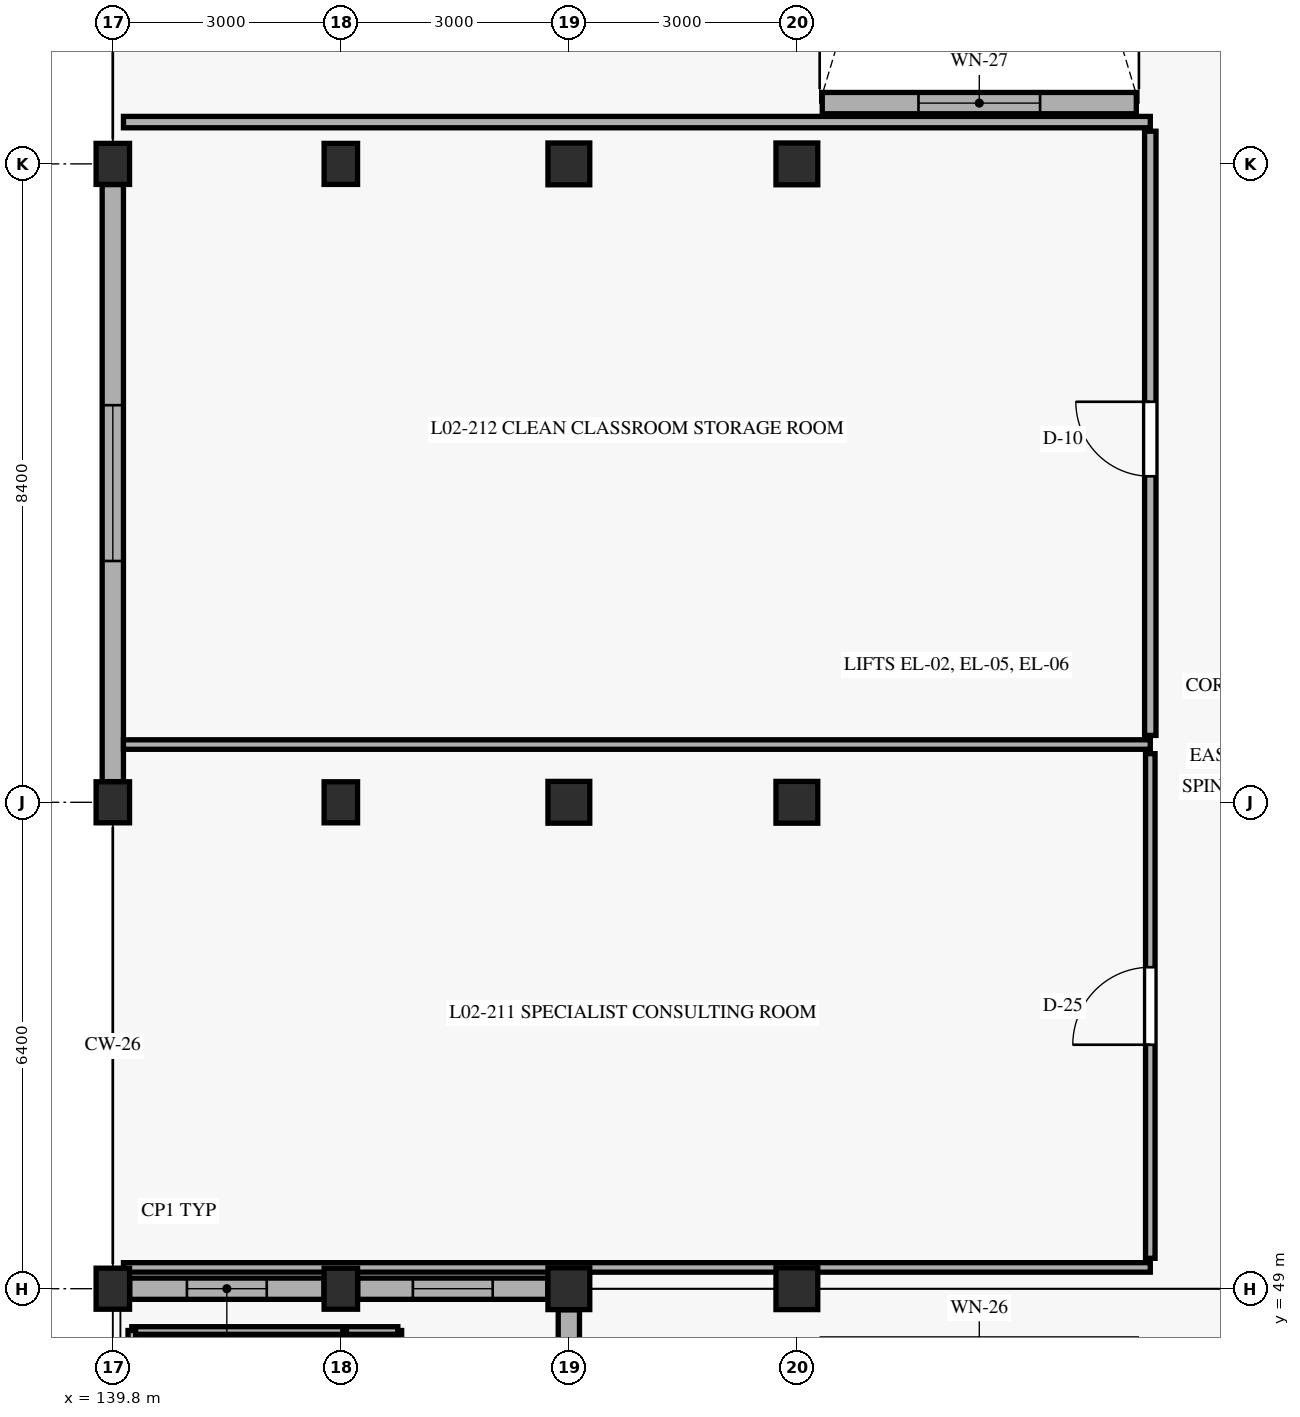
"""IFC4 building model, lengths in metres.
Left out: names, types, materials, properties, quantities, classifications, styles, units other than length and angle.
Written with IfcOpenShell. Run it as: python <this file> out.ifc"""

import sys

from ifc_helpers import new_model, si_unit, direction, frame, frame_2d, origin, origin_with_axes, origin_2d, place, context, subcontext, project, spatial, rectangle, extrude, element, fill, save


model = new_model("IFC4")
c1 = context("Model", 3, precision=1e-05, world=origin(), true_north=direction((0.0, 1.0)))
c2 = subcontext(c1, "Body", "Model", "MODEL_VIEW")
j1 = project(units=[si_unit("LENGTHUNIT", "METRE"), si_unit("PLANEANGLEUNIT", "RADIAN")], contexts=[c1])
p1 = place(None, origin())
s1 = spatial("IfcSite", under=j1, at=p1, CompositionType="ELEMENT")
p2 = place(p1, origin())
s2 = spatial("IfcBuilding", under=s1, at=p2, CompositionType="ELEMENT")
p3 = place(p2, frame((0.0, 0.0, 4.8)))
s3 = spatial("IfcBuildingStorey", under=s2, at=p3, CompositionType="ELEMENT", Elevation=4.8)
for number, where, z_axis, x_axis in (
    (1, (139.8, 49.0, 0.0), (0.0, 0.0, 1.0), (1.0, 0.0, 0.0)),
    (2, (139.8, 55.4, 0.0), (0.0, 0.0, 1.0), (1.0, 0.0, 0.0)),
    (3, (139.8, 63.8, 0.0), (0.0, 0.0, 1.0), (1.0, 0.0, 0.0)),
    (4, (142.8, 49.0, 0.0), (0.0, 0.0, 1.0), (1.0, 0.0, 0.0)),
    (5, (142.8, 55.4, 0.0), (0.0, 0.0, 1.0), (1.0, 0.0, 0.0)),
    (6, (142.8, 63.8, 0.0), (0.0, 0.0, 1.0), (1.0, 0.0, 0.0)),
):
    element("IfcColumn", number, at=place(p3, frame(where, z_axis=z_axis, x_axis=x_axis)), inside=s3, PredefinedType="PILASTER", context=c2, shape_type="SweptSolid", body=[
        extrude(rectangle(XDim=0.44, YDim=0.54, at=origin_2d()), origin(), (0.0, 0.0, 1.0), 4.5),
    ])
for number, where, z_axis, x_axis in (
    (7, (145.8, 49.0, 0.0), (0.0, 0.0, 1.0), (1.0, 0.0, 0.0)),
    (8, (145.8, 55.4, 0.0), (0.0, 0.0, 1.0), (1.0, 0.0, 0.0)),
    (9, (145.8, 63.8, 0.0), (0.0, 0.0, 1.0), (1.0, 0.0, 0.0)),
    (10, (148.8, 49.0, 0.0), (0.0, 0.0, 1.0), (1.0, 0.0, 0.0)),
    (11, (148.8, 55.4, 0.0), (0.0, 0.0, 1.0), (1.0, 0.0, 0.0)),
    (12, (148.8, 63.8, 0.0), (0.0, 0.0, 1.0), (1.0, 0.0, 0.0)),
):
    element("IfcColumn", number, at=place(p3, frame(where, z_axis=z_axis, x_axis=x_axis)), inside=s3, PredefinedType="COLUMN", context=c2, shape_type="SweptSolid", body=[
        extrude(rectangle(XDim=0.55, YDim=0.55, at=origin_2d()), origin(), (0.0, 0.0, 1.0), 4.5),
    ])
p4 = place(p3, frame((145.8, 48.723, 0.0), z_axis=(0.0, 0.0, 1.0), x_axis=(0.0, -1.0, 0.0)))
e13 = element("IfcWall", 13, at=p4, inside=s3, PredefinedType="SOLIDWALL", context=c2, shape_type="SweptSolid", body=[
    extrude(rectangle(XDim=5.846, YDim=0.28, at=frame_2d((2.923, 0.0))), origin(), (0.0, 0.0, 1.0), 3.79),
])
p5 = place(p4, frame((1.898, 0.0, 0.8)))
e14 = element("IfcOpeningElement", 14, at=p5, cuts=e13, PredefinedType="OPENING", context=c2, shape_type="SweptSolid", body=[
    extrude(rectangle(XDim=2.05, YDim=1.95, at=frame_2d((1.025, 0.975))), frame((0.0, 0.15, 0.0), z_axis=(0.0, -1.0, 0.0), x_axis=(1.0, 0.0, 0.0)), (0.0, 0.0, 1.0), 0.3),
])
p6 = place(p3, frame((139.8, 63.528, 0.0), z_axis=(0.0, 0.0, 1.0), x_axis=(0.0, -1.0, 0.0)))
e15 = element("IfcWall", 15, at=p6, inside=s3, PredefinedType="SOLIDWALL", context=c2, shape_type="SweptSolid", body=[
    extrude(rectangle(XDim=7.856, YDim=0.28, at=frame_2d((3.928, 0.0))), origin(), (0.0, 0.0, 1.0), 3.79),
])
p7 = place(p6, frame((2.903, 0.0, 0.8)))
e16 = element("IfcOpeningElement", 16, at=p7, cuts=e15, PredefinedType="OPENING", context=c2, shape_type="SweptSolid", body=[
    extrude(rectangle(XDim=2.05, YDim=1.95, at=frame_2d((1.025, 0.975))), frame((0.0, 0.15, 0.0), z_axis=(0.0, -1.0, 0.0), x_axis=(1.0, 0.0, 0.0)), (0.0, 0.0, 1.0), 0.3),
])
p8 = place(p3, frame((140.022, 49.0, 0.0), z_axis=(0.0, 0.0, 1.0), x_axis=(1.0, 0.0, 0.0)))
e17 = element("IfcWall", 17, at=p8, inside=s3, PredefinedType="SOLIDWALL", context=c2, shape_type="SweptSolid", body=[
    extrude(rectangle(XDim=2.556, YDim=0.28, at=frame_2d((1.278, 0.0))), origin(), (0.0, 0.0, 1.0), 3.89),
])
p9 = place(p8, frame((0.753, 0.0, 0.88)))
e18 = element("IfcOpeningElement", 18, at=p9, cuts=e17, PredefinedType="OPENING", context=c2, shape_type="SweptSolid", body=[
    extrude(rectangle(XDim=1.05, YDim=2.2, at=frame_2d((0.525, 1.1))), frame((0.0, 0.15, 0.0), z_axis=(0.0, -1.0, 0.0), x_axis=(1.0, 0.0, 0.0)), (0.0, 0.0, 1.0), 0.3),
])
p10 = place(p3, frame((143.022, 49.0, 0.0), z_axis=(0.0, 0.0, 1.0), x_axis=(1.0, 0.0, 0.0)))
e19 = element("IfcWall", 19, at=p10, inside=s3, PredefinedType="SOLIDWALL", context=c2, shape_type="SweptSolid", body=[
    extrude(rectangle(XDim=2.501, YDim=0.28, at=frame_2d((1.25, 0.0))), origin(), (0.0, 0.0, 1.0), 3.89),
])
p11 = place(p10, frame((0.726, 0.0, 0.88)))
e20 = element("IfcOpeningElement", 20, at=p11, cuts=e19, PredefinedType="OPENING", context=c2, shape_type="SweptSolid", body=[
    extrude(rectangle(XDim=1.05, YDim=2.2, at=frame_2d((0.525, 1.1))), frame((0.0, 0.15, 0.0), z_axis=(0.0, -1.0, 0.0), x_axis=(1.0, 0.0, 0.0)), (0.0, 0.0, 1.0), 0.3),
])
p12 = place(p3, frame((153.266, 64.6, 0.0), z_axis=(0.0, 0.0, 1.0), x_axis=(-1.0, 0.0, 0.0)))
e21 = element("IfcWall", 21, at=p12, inside=s3, PredefinedType="SOLIDWALL", context=c2, shape_type="SweptSolid", body=[
    extrude(rectangle(XDim=4.132, YDim=0.28, at=frame_2d((2.066, 0.0))), origin(), (0.0, 0.0, 1.0), 4.2),
])
p13 = place(p12, frame((1.266, 0.0, 0.85)))
e22 = element("IfcOpeningElement", 22, at=p13, cuts=e21, PredefinedType="OPENING", context=c2, shape_type="SweptSolid", body=[
    extrude(rectangle(XDim=1.6, YDim=1.8, at=frame_2d((0.8, 0.9))), frame((0.0, 0.15, 0.0), z_axis=(0.0, -1.0, 0.0), x_axis=(1.0, 0.0, 0.0)), (0.0, 0.0, 1.0), 0.3),
])
p14 = place(p3, frame((143.55, 4.75, 0.0), z_axis=(0.0, 0.0, 1.0), x_axis=(0.0, 1.0, 0.0)))
e23 = element("IfcWall", 23, at=p14, inside=s3, PredefinedType="PARAPET", context=c2, shape_type="SweptSolid", body=[
    extrude(rectangle(XDim=43.7, YDim=0.1, at=frame_2d((21.85, 0.0))), origin(), (0.0, 0.0, 1.0), 0.38),
])
p15 = place(p3, frame((143.55, 48.45, 0.0), z_axis=(0.0, 0.0, 1.0), x_axis=(-1.0, 0.0, 0.0)))
e24 = element("IfcWall", 24, at=p15, inside=s3, PredefinedType="PARAPET", context=c2, shape_type="SweptSolid", body=[
    extrude(rectangle(XDim=3.5, YDim=0.1, at=frame_2d((1.75, 0.0))), origin(), (0.0, 0.0, 1.0), 0.38),
])
p16 = place(p3, frame((140.05, 48.45, 0.0), z_axis=(0.0, 0.0, 1.0), x_axis=(0.0, -1.0, 0.0)))
e25 = element("IfcWall", 25, at=p16, inside=s3, PredefinedType="PARAPET", context=c2, shape_type="SweptSolid", body=[
    extrude(rectangle(XDim=43.7, YDim=0.1, at=frame_2d((21.85, 0.0))), origin(), (0.0, 0.0, 1.0), 0.38),
])
p17 = place(p3, frame((153.45, 49.4, 0.0), z_axis=(0.0, 0.0, 1.0), x_axis=(0.0, 1.0, 0.0)))
e26 = element("IfcWall", 26, at=p17, inside=s3, PredefinedType="PARTITIONING", context=c2, shape_type="SweptSolid", body=[
    extrude(rectangle(XDim=6.64, YDim=0.125, at=frame_2d((3.32, 0.0))), origin(), (0.0, 0.0, 1.0), 3.795),
])
p18 = place(p17, frame((2.81, 0.0, 0.0)))
e27 = element("IfcOpeningElement", 27, at=p18, cuts=e26, PredefinedType="OPENING", context=c2, shape_type="SweptSolid", body=[
    extrude(rectangle(XDim=1.02, YDim=2.18, at=frame_2d((0.51, 1.09))), frame((0.0, 0.073, 0.0), z_axis=(0.0, -1.0, 0.0), x_axis=(1.0, 0.0, 0.0)), (0.0, 0.0, 1.0), 0.145),
])
for number, where, z_axis, x_axis in (
    (28, (139.94, 49.28, 0.0), (0.0, 0.0, 1.0), (1.0, 0.0, 0.0)),
    (29, (139.94, 56.16, 0.0), (0.0, 0.0, 1.0), (1.0, 0.0, 0.0)),
):
    element("IfcWall", number, at=place(p3, frame(where, z_axis=z_axis, x_axis=x_axis)), inside=s3, PredefinedType="PARTITIONING", context=c2, shape_type="SweptSolid", body=[
        extrude(rectangle(XDim=13.51, YDim=0.125, at=frame_2d((6.755, 0.0))), origin(), (0.0, 0.0, 1.0), 3.735),
    ])
p19 = place(p3, frame((153.45, 56.28, 0.0), z_axis=(0.0, 0.0, 1.0), x_axis=(0.0, 1.0, 0.0)))
e30 = element("IfcWall", 30, at=p19, inside=s3, PredefinedType="PARTITIONING", context=c2, shape_type="SweptSolid", body=[
    extrude(rectangle(XDim=7.95, YDim=0.15, at=frame_2d((3.975, 0.0))), origin(), (0.0, 0.0, 1.0), 3.795),
])
p20 = place(p19, frame((3.41, 0.0, 0.0)))
e31 = element("IfcOpeningElement", 31, at=p20, cuts=e30, PredefinedType="OPENING", context=c2, shape_type="SweptSolid", body=[
    extrude(rectangle(XDim=0.98, YDim=2.12, at=frame_2d((0.49, 1.06))), frame((0.0, 0.085, 0.0), z_axis=(0.0, -1.0, 0.0), x_axis=(1.0, 0.0, 0.0)), (0.0, 0.0, 1.0), 0.17),
])
p21 = place(p3, frame((139.94, 64.35, 0.0), z_axis=(0.0, 0.0, 1.0), x_axis=(1.0, 0.0, 0.0)))
e32 = element("IfcWall", 32, at=p21, inside=s3, PredefinedType="PARTITIONING", context=c2, shape_type="SweptSolid", body=[
    extrude(rectangle(XDim=13.51, YDim=0.15, at=frame_2d((6.755, 0.0))), origin(), (0.0, 0.0, 1.0), 3.735),
])
p22 = place(p7, origin_with_axes())
e33 = element("IfcWindow", 33, at=p22, inside=s3, PartitioningType="SINGLE_PANEL", PredefinedType="WINDOW", context=c2, shape_type="SweptSolid", body=[
    extrude(rectangle(XDim=2.05, YDim=1.95, at=frame_2d((1.025, 0.975))), frame((0.0, 0.03, 0.0), z_axis=(0.0, -1.0, 0.0), x_axis=(1.0, 0.0, 0.0)), (0.0, 0.0, 1.0), 0.06),
])
fill(e16, e33)
p23 = place(p9, origin_with_axes())
e34 = element("IfcWindow", 34, at=p23, inside=s3, PartitioningType="SINGLE_PANEL", PredefinedType="WINDOW", context=c2, shape_type="SweptSolid", body=[
    extrude(rectangle(XDim=1.05, YDim=2.2, at=frame_2d((0.525, 1.1))), frame((0.0, 0.03, 0.0), z_axis=(0.0, -1.0, 0.0), x_axis=(1.0, 0.0, 0.0)), (0.0, 0.0, 1.0), 0.06),
])
fill(e18, e34)
p24 = place(p11, origin_with_axes())
e35 = element("IfcWindow", 35, at=p24, inside=s3, PartitioningType="SINGLE_PANEL", PredefinedType="WINDOW", context=c2, shape_type="SweptSolid", body=[
    extrude(rectangle(XDim=1.05, YDim=2.2, at=frame_2d((0.525, 1.1))), frame((0.0, 0.03, 0.0), z_axis=(0.0, -1.0, 0.0), x_axis=(1.0, 0.0, 0.0)), (0.0, 0.0, 1.0), 0.06),
])
fill(e20, e35)
p25 = place(p13, origin_with_axes())
e36 = element("IfcWindow", 36, at=p25, inside=s3, PartitioningType="SINGLE_PANEL", PredefinedType="WINDOW", context=c2, shape_type="SweptSolid", body=[
    extrude(rectangle(XDim=1.6, YDim=1.8, at=frame_2d((0.8, 0.9))), frame((0.0, 0.03, 0.0), z_axis=(0.0, -1.0, 0.0), x_axis=(1.0, 0.0, 0.0)), (0.0, 0.0, 1.0), 0.06),
])
fill(e22, e36)
p26 = place(p18, origin_with_axes())
e37 = element("IfcDoor", 37, at=p26, inside=s3, OperationType="SINGLE_SWING_LEFT", PredefinedType="DOOR", context=c2, shape_type="SweptSolid", body=[
    extrude(rectangle(XDim=1.02, YDim=2.18, at=frame_2d((0.51, 1.09))), frame((0.0, 0.025, 0.0), z_axis=(0.0, -1.0, 0.0), x_axis=(1.0, 0.0, 0.0)), (0.0, 0.0, 1.0), 0.05),
])
fill(e27, e37)
p27 = place(p20, origin_with_axes())
e38 = element("IfcDoor", 38, at=p27, inside=s3, OperationType="SINGLE_SWING_RIGHT", PredefinedType="DOOR", context=c2, shape_type="SweptSolid", body=[
    extrude(rectangle(XDim=0.98, YDim=2.12, at=frame_2d((0.49, 1.06))), frame((0.0, 0.025, 0.0), z_axis=(0.0, -1.0, 0.0), x_axis=(1.0, 0.0, 0.0)), (0.0, 0.0, 1.0), 0.05),
])
fill(e31, e38)
save(model, sys.argv[1])
